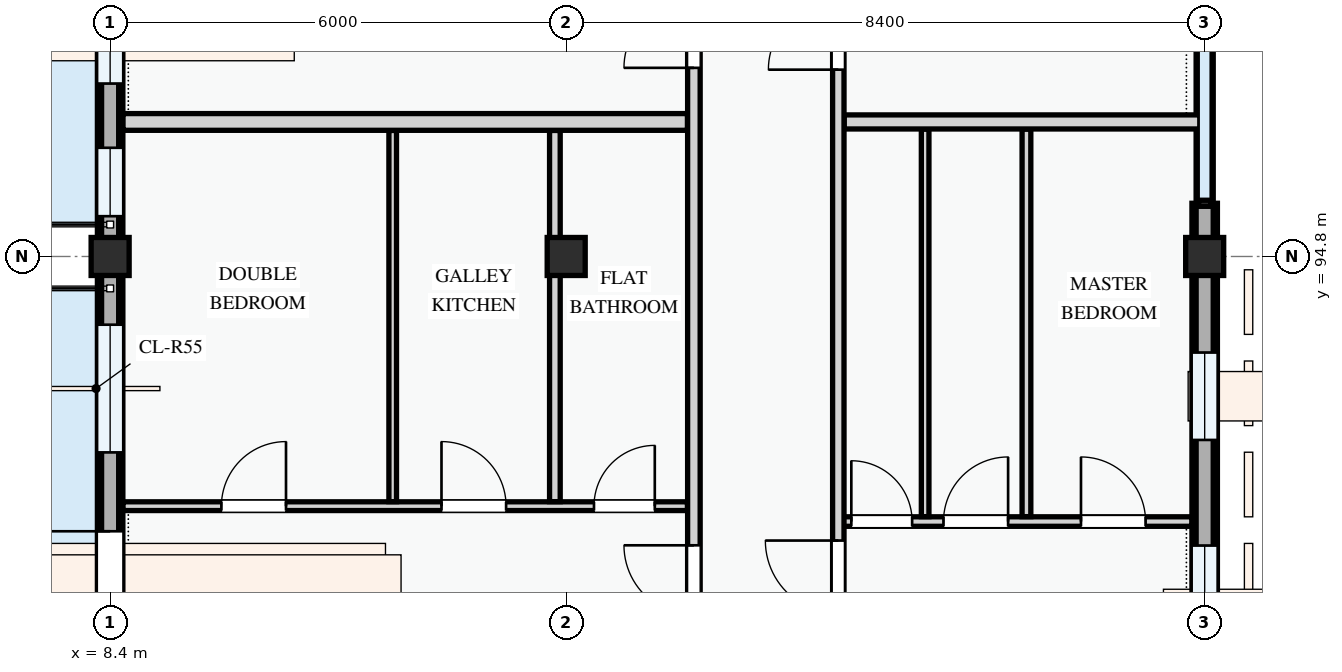
"""IFC4 building model, lengths in metres.
Left out: names, types, materials, properties, quantities, classifications, styles, units other than length and angle.
Written with IfcOpenShell. Run it as: python <this file> out.ifc"""

import sys

from ifc_helpers import new_model, si_unit, direction, frame, frame_2d, origin, origin_2d, place, context, subcontext, project, spatial, polyline, rectangle, outline, extrude, element, fill, save


model = new_model("IFC4")
c1 = context("Model", 3, precision=1e-05, world=origin(), true_north=direction((0.0, 1.0)))
c2 = subcontext(c1, "Body", "Model", "MODEL_VIEW")
j1 = project(units=[si_unit("LENGTHUNIT", "METRE"), si_unit("PLANEANGLEUNIT", "RADIAN")], contexts=[c1])
p1 = place(None, origin())
s1 = spatial("IfcSite", under=j1, at=p1, CompositionType="ELEMENT")
p2 = place(p1, origin())
s2 = spatial("IfcBuilding", under=s1, at=p2, CompositionType="ELEMENT")
p3 = place(p2, frame((0.0, 0.0, 51.0)))
s3 = spatial("IfcBuildingStorey", under=s2, at=p3, CompositionType="ELEMENT", Elevation=51.0)
for number, where, z_axis, x_axis in (
    (1, (8.4, 94.8, 0.0), (0.0, 0.0, 1.0), (1.0, 0.0, 0.0)),
    (2, (14.4, 94.8, 0.0), (0.0, 0.0, 1.0), (1.0, 0.0, 0.0)),
    (3, (22.8, 94.8, 0.0), (0.0, 0.0, 1.0), (1.0, 0.0, 0.0)),
):
    element("IfcColumn", number, at=place(p3, frame(where, z_axis=z_axis, x_axis=x_axis)), inside=s3, PredefinedType="COLUMN", context=c2, shape_type="SweptSolid", body=[
        extrude(rectangle(XDim=0.5, YDim=0.5, at=origin_2d()), origin(), (0.0, 0.0, 1.0), 3.3),
    ])
p4 = place(p3, frame((8.4, 100.8, 0.0), z_axis=(0.0, 0.0, 1.0), x_axis=(0.0, -1.0, 0.0)))
e4 = element("IfcWall", 4, at=p4, inside=s3, PredefinedType="STANDARD", context=c2, shape_type="SweptSolid", body=[
    extrude(rectangle(XDim=6.0, YDim=0.335, at=frame_2d((3.0, 0.0))), origin(), (0.0, 0.0, 1.0), 2.595),
])
p5 = place(p4, frame((0.62, 0.0, 0.0)))
e5 = element("IfcOpeningElement", 5, at=p5, cuts=e4, PredefinedType="OPENING", context=c2, shape_type="SweptSolid", body=[
    extrude(rectangle(XDim=1.2, YDim=2.15, at=frame_2d((0.6, 1.075))), frame((0.0, 0.177, 0.0), z_axis=(0.0, -1.0, 0.0), x_axis=(1.0, 0.0, 0.0)), (0.0, 0.0, 1.0), 0.355),
])
p6 = place(p4, frame((2.375, 0.0, 0.78)))
e6 = element("IfcOpeningElement", 6, at=p6, cuts=e4, PredefinedType="OPENING", context=c2, shape_type="SweptSolid", body=[
    extrude(rectangle(XDim=1.35, YDim=1.55, at=frame_2d((0.675, 0.775))), frame((0.0, 0.177, 0.0), z_axis=(0.0, -1.0, 0.0), x_axis=(1.0, 0.0, 0.0)), (0.0, 0.0, 1.0), 0.355),
])
p7 = place(p4, frame((4.57, 0.0, 0.78)))
e7 = element("IfcOpeningElement", 7, at=p7, cuts=e4, PredefinedType="OPENING", context=c2, shape_type="SweptSolid", body=[
    extrude(rectangle(XDim=0.9, YDim=1.2, at=frame_2d((0.45, 0.6))), frame((0.0, 0.177, 0.0), z_axis=(0.0, -1.0, 0.0), x_axis=(1.0, 0.0, 0.0)), (0.0, 0.0, 1.0), 0.355),
])
p8 = place(p3, frame((8.4, 94.8, 0.0), z_axis=(0.0, 0.0, 1.0), x_axis=(0.0, -1.0, 0.0)))
e8 = element("IfcWall", 8, at=p8, inside=s3, PredefinedType="STANDARD", context=c2, shape_type="SweptSolid", body=[
    extrude(rectangle(XDim=8.4, YDim=0.335, at=frame_2d((4.2, 0.0))), origin(), (0.0, 0.0, 1.0), 2.445),
])
p9 = place(p8, frame((3.615, 0.0, 0.0)))
e9 = element("IfcOpeningElement", 9, at=p9, cuts=e8, PredefinedType="OPENING", context=c2, shape_type="SweptSolid", body=[
    extrude(rectangle(XDim=1.25, YDim=2.2, at=frame_2d((0.625, 1.1))), frame((0.0, 0.177, 0.0), z_axis=(0.0, -1.0, 0.0), x_axis=(1.0, 0.0, 0.0)), (0.0, 0.0, 1.0), 0.355),
])
p10 = place(p8, frame((0.897, 0.0, 0.78)))
e10 = element("IfcOpeningElement", 10, at=p10, cuts=e8, PredefinedType="OPENING", context=c2, shape_type="SweptSolid", body=[
    extrude(rectangle(XDim=1.68, YDim=1.46, at=frame_2d((0.84, 0.73))), frame((0.0, 0.177, 0.0), z_axis=(0.0, -1.0, 0.0), x_axis=(1.0, 0.0, 0.0)), (0.0, 0.0, 1.0), 0.355),
])
p11 = place(p8, frame((6.038, 0.0, 0.78)))
e11 = element("IfcOpeningElement", 11, at=p11, cuts=e8, PredefinedType="OPENING", context=c2, shape_type="SweptSolid", body=[
    extrude(rectangle(XDim=1.05, YDim=1.2, at=frame_2d((0.525, 0.6))), frame((0.0, 0.177, 0.0), z_axis=(0.0, -1.0, 0.0), x_axis=(1.0, 0.0, 0.0)), (0.0, 0.0, 1.0), 0.355),
])
p12 = place(p3, frame((22.8, 86.4, 0.0), z_axis=(0.0, 0.0, 1.0), x_axis=(0.0, 1.0, 0.0)))
e12 = element("IfcWall", 12, at=p12, inside=s3, PredefinedType="STANDARD", context=c2, shape_type="SweptSolid", body=[
    extrude(rectangle(XDim=8.4, YDim=0.335, at=frame_2d((4.2, 0.0))), origin(), (0.0, 0.0, 1.0), 2.445),
])
p13 = place(p12, frame((0.731, 0.0, 0.78)))
e13 = element("IfcOpeningElement", 13, at=p13, cuts=e12, PredefinedType="OPENING", context=c2, shape_type="SweptSolid", body=[
    extrude(rectangle(XDim=1.35, YDim=1.55, at=frame_2d((0.675, 0.775))), frame((0.0, 0.177, 0.0), z_axis=(0.0, -1.0, 0.0), x_axis=(1.0, 0.0, 0.0)), (0.0, 0.0, 1.0), 0.355),
])
p14 = place(p12, frame((2.797, 0.0, 0.78)))
e14 = element("IfcOpeningElement", 14, at=p14, cuts=e12, PredefinedType="OPENING", context=c2, shape_type="SweptSolid", body=[
    extrude(rectangle(XDim=1.8, YDim=1.5, at=frame_2d((0.9, 0.75))), frame((0.0, 0.177, 0.0), z_axis=(0.0, -1.0, 0.0), x_axis=(1.0, 0.0, 0.0)), (0.0, 0.0, 1.0), 0.355),
])
p15 = place(p12, frame((5.986, 0.0, 0.78)))
e15 = element("IfcOpeningElement", 15, at=p15, cuts=e12, PredefinedType="OPENING", context=c2, shape_type="SweptSolid", body=[
    extrude(rectangle(XDim=1.15, YDim=1.25, at=frame_2d((0.575, 0.625))), frame((0.0, 0.177, 0.0), z_axis=(0.0, -1.0, 0.0), x_axis=(1.0, 0.0, 0.0)), (0.0, 0.0, 1.0), 0.355),
])
p16 = place(p3, frame((22.8, 94.8, 0.0), z_axis=(0.0, 0.0, 1.0), x_axis=(0.0, 1.0, 0.0)))
e16 = element("IfcWall", 16, at=p16, inside=s3, PredefinedType="STANDARD", context=c2, shape_type="SweptSolid", body=[
    extrude(rectangle(XDim=0.7, YDim=0.335, at=frame_2d((0.35, 0.0))), origin(), (0.0, 0.0, 1.0), 2.595),
])
p17 = place(p3, frame((8.4, 100.8, 3.3), z_axis=(0.0, 0.0, 1.0), x_axis=(0.0, -1.0, 0.0)))
e17 = element("IfcWall", 17, at=p17, inside=s3, PredefinedType="PARAPET", context=c2, shape_type="SweptSolid", body=[
    extrude(outline(polyline([(0.0, 0.0), (6.0, 0.0), (6.0, 1.12), (5.5, 1.322), (5.0, 1.484), (4.5, 1.618), (4.0, 1.717), (3.5, 1.779), (3.0, 1.8), (2.5, 1.779), (2.0, 1.717), (1.5, 1.618), (1.0, 1.484), (0.5, 1.322), (0.0, 1.12), (0.0, 0.0)])), frame((0.0, 0.113, 0.0), z_axis=(0.0, -1.0, 0.0), x_axis=(1.0, 0.0, 0.0)), (0.0, 0.0, 1.0), 0.225),
])
p18 = place(p3, frame((8.4, 94.8, 3.3), z_axis=(0.0, 0.0, 1.0), x_axis=(0.0, -1.0, 0.0)))
e18 = element("IfcWall", 18, at=p18, inside=s3, PredefinedType="PARAPET", context=c2, shape_type="SweptSolid", body=[
    extrude(outline(polyline([(0.0, 0.0), (8.4, 0.0), (8.4, 1.12), (7.7, 1.322), (7.0, 1.484), (6.3, 1.618), (5.6, 1.717), (4.9, 1.779), (4.2, 1.8), (3.5, 1.779), (2.8, 1.717), (2.1, 1.618), (1.4, 1.484), (0.7, 1.322), (0.0, 1.12), (0.0, 0.0)])), frame((0.0, 0.113, 0.0), z_axis=(0.0, -1.0, 0.0), x_axis=(1.0, 0.0, 0.0)), (0.0, 0.0, 1.0), 0.225),
])
p19 = place(p3, frame((22.8, 86.4, 3.3), z_axis=(0.0, 0.0, 1.0), x_axis=(0.0, 1.0, 0.0)))
e19 = element("IfcWall", 19, at=p19, inside=s3, PredefinedType="PARAPET", context=c2, shape_type="SweptSolid", body=[
    extrude(rectangle(XDim=22.8, YDim=0.225, at=frame_2d((11.4, 0.0))), origin(), (0.0, 0.0, 1.0), 1.15),
])
p20 = place(p3, frame((8.57, 91.515, 0.0), z_axis=(0.0, 0.0, 1.0), x_axis=(1.0, 0.0, 0.0)))
e20 = element("IfcWall", 20, at=p20, inside=s3, PredefinedType="PARTITIONING", context=c2, shape_type="SweptSolid", body=[
    extrude(rectangle(XDim=7.426, YDim=0.115, at=frame_2d((3.713, 0.0))), origin(), (0.0, 0.0, 1.0), 3.0),
])
p21 = place(p20, frame((1.294, 0.0, 0.0)))
e21 = element("IfcOpeningElement", 21, at=p21, cuts=e20, PredefinedType="OPENING", context=c2, shape_type="SweptSolid", body=[
    extrude(rectangle(XDim=0.85, YDim=2.1, at=frame_2d((0.425, 1.05))), frame((0.0, 0.067, 0.0), z_axis=(0.0, -1.0, 0.0), x_axis=(1.0, 0.0, 0.0)), (0.0, 0.0, 1.0), 0.135),
])
p22 = place(p20, frame((4.19, 0.0, 0.0)))
e22 = element("IfcOpeningElement", 22, at=p22, cuts=e20, PredefinedType="OPENING", context=c2, shape_type="SweptSolid", body=[
    extrude(rectangle(XDim=0.85, YDim=2.1, at=frame_2d((0.425, 1.05))), frame((0.0, 0.067, 0.0), z_axis=(0.0, -1.0, 0.0), x_axis=(1.0, 0.0, 0.0)), (0.0, 0.0, 1.0), 0.135),
])
p23 = place(p20, frame((6.196, 0.0, 0.0)))
e23 = element("IfcOpeningElement", 23, at=p23, cuts=e20, PredefinedType="OPENING", context=c2, shape_type="SweptSolid", body=[
    extrude(rectangle(XDim=0.8, YDim=2.1, at=frame_2d((0.4, 1.05))), frame((0.0, 0.067, 0.0), z_axis=(0.0, -1.0, 0.0), x_axis=(1.0, 0.0, 0.0)), (0.0, 0.0, 1.0), 0.135),
])
p24 = place(p3, frame((12.118, 91.574, 0.0), z_axis=(0.0, 0.0, 1.0), x_axis=(0.0, 1.0, 0.0)))
e24 = element("IfcWall", 24, at=p24, inside=s3, PredefinedType="PARTITIONING", context=c2, shape_type="SweptSolid", body=[
    extrude(rectangle(XDim=4.884, YDim=0.1, at=frame_2d((2.442, 0.0))), origin(), (0.0, 0.0, 1.0), 3.0),
])
p25 = place(p3, frame((14.251, 91.574, 0.0), z_axis=(0.0, 0.0, 1.0), x_axis=(0.0, 1.0, 0.0)))
e25 = element("IfcWall", 25, at=p25, inside=s3, PredefinedType="PARTITIONING", context=c2, shape_type="SweptSolid", body=[
    extrude(rectangle(XDim=4.884, YDim=0.14, at=frame_2d((2.442, 0.0))), origin(), (0.0, 0.0, 1.0), 2.445),
])
p26 = place(p3, frame((17.98, 91.313, 0.0), z_axis=(0.0, 0.0, 1.0), x_axis=(1.0, 0.0, 0.0)))
e26 = element("IfcWall", 26, at=p26, inside=s3, PredefinedType="PARTITIONING", context=c2, shape_type="SweptSolid", body=[
    extrude(rectangle(XDim=4.651, YDim=0.125, at=frame_2d((2.325, 0.0))), origin(), (0.0, 0.0, 1.0), 3.0),
])
p27 = place(p26, frame((0.171, 0.0, 0.0)))
e27 = element("IfcOpeningElement", 27, at=p27, cuts=e26, PredefinedType="OPENING", context=c2, shape_type="SweptSolid", body=[
    extrude(rectangle(XDim=0.8, YDim=2.1, at=frame_2d((0.4, 1.05))), frame((0.0, 0.073, 0.0), z_axis=(0.0, -1.0, 0.0), x_axis=(1.0, 0.0, 0.0)), (0.0, 0.0, 1.0), 0.145),
])
p28 = place(p26, frame((1.384, 0.0, 0.0)))
e28 = element("IfcOpeningElement", 28, at=p28, cuts=e26, PredefinedType="OPENING", context=c2, shape_type="SweptSolid", body=[
    extrude(rectangle(XDim=0.85, YDim=2.1, at=frame_2d((0.425, 1.05))), frame((0.0, 0.073, 0.0), z_axis=(0.0, -1.0, 0.0), x_axis=(1.0, 0.0, 0.0)), (0.0, 0.0, 1.0), 0.145),
])
p29 = place(p26, frame((3.193, 0.0, 0.0)))
e29 = element("IfcOpeningElement", 29, at=p29, cuts=e26, PredefinedType="OPENING", context=c2, shape_type="SweptSolid", body=[
    extrude(rectangle(XDim=0.85, YDim=2.1, at=frame_2d((0.425, 1.05))), frame((0.0, 0.073, 0.0), z_axis=(0.0, -1.0, 0.0), x_axis=(1.0, 0.0, 0.0)), (0.0, 0.0, 1.0), 0.145),
])
p30 = place(p3, frame((20.455, 91.377, 0.0), z_axis=(0.0, 0.0, 1.0), x_axis=(0.0, 1.0, 0.0)))
e30 = element("IfcWall", 30, at=p30, inside=s3, PredefinedType="PARTITIONING", context=c2, shape_type="SweptSolid", body=[
    extrude(rectangle(XDim=5.098, YDim=0.115, at=frame_2d((2.549, 0.0))), origin(), (0.0, 0.0, 1.0), 3.0),
])
p31 = place(p3, frame((19.122, 91.377, 0.0), z_axis=(0.0, 0.0, 1.0), x_axis=(0.0, 1.0, 0.0)))
e31 = element("IfcWall", 31, at=p31, inside=s3, PredefinedType="PARTITIONING", context=c2, shape_type="SweptSolid", body=[
    extrude(rectangle(XDim=5.098, YDim=0.1, at=frame_2d((2.549, 0.0))), origin(), (0.0, 0.0, 1.0), 3.0),
])
p32 = place(p3, frame((8.57, 96.57, 0.0), z_axis=(0.0, 0.0, 1.0), x_axis=(1.0, 0.0, 0.0)))
e32 = element("IfcWall", 32, at=p32, inside=s3, PredefinedType="PARTITIONING", context=c2, shape_type="SweptSolid", body=[
    extrude(rectangle(XDim=7.426, YDim=0.22, at=frame_2d((3.713, 0.0))), origin(), (0.0, 0.0, 1.0), 3.0),
])
p33 = place(p3, frame((18.057, 96.57, 0.0), z_axis=(0.0, 0.0, 1.0), x_axis=(1.0, 0.0, 0.0)))
e33 = element("IfcWall", 33, at=p33, inside=s3, PredefinedType="PARTITIONING", context=c2, shape_type="SweptSolid", body=[
    extrude(rectangle(XDim=4.683, YDim=0.185, at=frame_2d((2.342, 0.0))), origin(), (0.0, 0.0, 1.0), 3.0),
])
p34 = place(p3, frame((16.08, 86.46, 0.0), z_axis=(0.0, 0.0, 1.0), x_axis=(0.0, 1.0, 0.0)))
e34 = element("IfcWall", 34, at=p34, inside=s3, PredefinedType="PARTITIONING", context=c2, shape_type="SweptSolid", body=[
    extrude(rectangle(XDim=22.88, YDim=0.165, at=frame_2d((11.44, 0.0))), origin(), (0.0, 0.0, 1.0), 3.0),
])
p35 = place(p34, frame((3.62, 0.0, 0.0)))
e35 = element("IfcOpeningElement", 35, at=p35, cuts=e34, PredefinedType="OPENING", context=c2, shape_type="SweptSolid", body=[
    extrude(rectangle(XDim=0.92, YDim=2.1, at=frame_2d((0.46, 1.05))), frame((0.0, 0.093, 0.0), z_axis=(0.0, -1.0, 0.0), x_axis=(1.0, 0.0, 0.0)), (0.0, 0.0, 1.0), 0.185),
])
p36 = place(p34, frame((10.822, 0.0, 0.0)))
e36 = element("IfcOpeningElement", 36, at=p36, cuts=e34, PredefinedType="OPENING", context=c2, shape_type="SweptSolid", body=[
    extrude(rectangle(XDim=0.92, YDim=2.1, at=frame_2d((0.46, 1.05))), frame((0.0, 0.093, 0.0), z_axis=(0.0, -1.0, 0.0), x_axis=(1.0, 0.0, 0.0)), (0.0, 0.0, 1.0), 0.185),
])
p37 = place(p3, frame((17.98, 86.46, 0.0), z_axis=(0.0, 0.0, 1.0), x_axis=(0.0, 1.0, 0.0)))
e37 = element("IfcWall", 37, at=p37, inside=s3, PredefinedType="PARTITIONING", context=c2, shape_type="SweptSolid", body=[
    extrude(rectangle(XDim=22.88, YDim=0.15, at=frame_2d((11.44, 0.0))), origin(), (0.0, 0.0, 1.0), 3.0),
])
p38 = place(p37, frame((3.643, 0.0, 0.0)))
e38 = element("IfcOpeningElement", 38, at=p38, cuts=e37, PredefinedType="OPENING", context=c2, shape_type="SweptSolid", body=[
    extrude(rectangle(XDim=0.96, YDim=2.12, at=frame_2d((0.48, 1.06))), frame((0.0, 0.085, 0.0), z_axis=(0.0, -1.0, 0.0), x_axis=(1.0, 0.0, 0.0)), (0.0, 0.0, 1.0), 0.17),
])
p39 = place(p37, frame((10.798, 0.0, 0.0)))
e39 = element("IfcOpeningElement", 39, at=p39, cuts=e37, PredefinedType="OPENING", context=c2, shape_type="SweptSolid", body=[
    extrude(rectangle(XDim=0.92, YDim=2.1, at=frame_2d((0.46, 1.05))), frame((0.0, 0.085, 0.0), z_axis=(0.0, -1.0, 0.0), x_axis=(1.0, 0.0, 0.0)), (0.0, 0.0, 1.0), 0.17),
])
p40 = place(p6, origin())
e40 = element("IfcWindow", 40, at=p40, inside=s3, PartitioningType="SINGLE_PANEL", PredefinedType="WINDOW", context=c2, shape_type="SweptSolid", body=[
    extrude(rectangle(XDim=1.35, YDim=1.55, at=frame_2d((0.675, 0.775))), frame((0.0, 0.03, 0.0), z_axis=(0.0, -1.0, 0.0), x_axis=(1.0, 0.0, 0.0)), (0.0, 0.0, 1.0), 0.06),
])
fill(e6, e40)
p41 = place(p7, origin())
e41 = element("IfcWindow", 41, at=p41, inside=s3, PartitioningType="SINGLE_PANEL", PredefinedType="WINDOW", context=c2, shape_type="SweptSolid", body=[
    extrude(rectangle(XDim=0.9, YDim=1.2, at=frame_2d((0.45, 0.6))), frame((0.0, 0.03, 0.0), z_axis=(0.0, -1.0, 0.0), x_axis=(1.0, 0.0, 0.0)), (0.0, 0.0, 1.0), 0.06),
])
fill(e7, e41)
p42 = place(p9, frame((1.25, 0.0, 0.0), z_axis=(0.0, 0.0, 1.0), x_axis=(-1.0, 0.0, 0.0)))
e42 = element("IfcDoor", 42, at=p42, inside=s3, OperationType="SINGLE_SWING_RIGHT", PredefinedType="DOOR", context=c2, shape_type="SweptSolid", body=[
    extrude(rectangle(XDim=1.25, YDim=2.2, at=frame_2d((0.625, 1.1))), frame((0.0, 0.025, 0.0), z_axis=(0.0, -1.0, 0.0), x_axis=(1.0, 0.0, 0.0)), (0.0, 0.0, 1.0), 0.05),
])
fill(e9, e42)
p43 = place(p10, origin())
e43 = element("IfcWindow", 43, at=p43, inside=s3, PartitioningType="DOUBLE_PANEL_VERTICAL", PredefinedType="WINDOW", context=c2, shape_type="SweptSolid", body=[
    extrude(rectangle(XDim=1.68, YDim=1.46, at=frame_2d((0.84, 0.73))), frame((0.0, 0.03, 0.0), z_axis=(0.0, -1.0, 0.0), x_axis=(1.0, 0.0, 0.0)), (0.0, 0.0, 1.0), 0.06),
])
fill(e10, e43)
p44 = place(p14, origin())
e44 = element("IfcWindow", 44, at=p44, inside=s3, PartitioningType="DOUBLE_PANEL_VERTICAL", PredefinedType="WINDOW", context=c2, shape_type="SweptSolid", body=[
    extrude(rectangle(XDim=1.8, YDim=1.5, at=frame_2d((0.9, 0.75))), frame((0.0, 0.03, 0.0), z_axis=(0.0, -1.0, 0.0), x_axis=(1.0, 0.0, 0.0)), (0.0, 0.0, 1.0), 0.06),
])
fill(e14, e44)
p45 = place(p15, origin())
e45 = element("IfcWindow", 45, at=p45, inside=s3, PartitioningType="SINGLE_PANEL", PredefinedType="WINDOW", context=c2, shape_type="SweptSolid", body=[
    extrude(rectangle(XDim=1.15, YDim=1.25, at=frame_2d((0.575, 0.625))), frame((0.0, 0.03, 0.0), z_axis=(0.0, -1.0, 0.0), x_axis=(1.0, 0.0, 0.0)), (0.0, 0.0, 1.0), 0.06),
])
fill(e15, e45)
p46 = place(p21, origin())
e46 = element("IfcDoor", 46, at=p46, inside=s3, OperationType="SINGLE_SWING_RIGHT", PredefinedType="DOOR", context=c2, shape_type="SweptSolid", body=[
    extrude(rectangle(XDim=0.85, YDim=2.1, at=frame_2d((0.425, 1.05))), frame((0.0, 0.025, 0.0), z_axis=(0.0, -1.0, 0.0), x_axis=(1.0, 0.0, 0.0)), (0.0, 0.0, 1.0), 0.05),
])
fill(e21, e46)
p47 = place(p22, origin())
e47 = element("IfcDoor", 47, at=p47, inside=s3, OperationType="SINGLE_SWING_LEFT", PredefinedType="DOOR", context=c2, shape_type="SweptSolid", body=[
    extrude(rectangle(XDim=0.85, YDim=2.1, at=frame_2d((0.425, 1.05))), frame((0.0, 0.025, 0.0), z_axis=(0.0, -1.0, 0.0), x_axis=(1.0, 0.0, 0.0)), (0.0, 0.0, 1.0), 0.05),
])
fill(e22, e47)
p48 = place(p23, origin())
e48 = element("IfcDoor", 48, at=p48, inside=s3, OperationType="SINGLE_SWING_RIGHT", PredefinedType="DOOR", context=c2, shape_type="SweptSolid", body=[
    extrude(rectangle(XDim=0.8, YDim=2.1, at=frame_2d((0.4, 1.05))), frame((0.0, 0.025, 0.0), z_axis=(0.0, -1.0, 0.0), x_axis=(1.0, 0.0, 0.0)), (0.0, 0.0, 1.0), 0.05),
])
fill(e23, e48)
p49 = place(p27, origin())
e49 = element("IfcDoor", 49, at=p49, inside=s3, OperationType="SINGLE_SWING_LEFT", PredefinedType="DOOR", context=c2, shape_type="SweptSolid", body=[
    extrude(rectangle(XDim=0.8, YDim=2.1, at=frame_2d((0.4, 1.05))), frame((0.0, 0.025, 0.0), z_axis=(0.0, -1.0, 0.0), x_axis=(1.0, 0.0, 0.0)), (0.0, 0.0, 1.0), 0.05),
])
fill(e27, e49)
p50 = place(p28, origin())
e50 = element("IfcDoor", 50, at=p50, inside=s3, OperationType="SINGLE_SWING_RIGHT", PredefinedType="DOOR", context=c2, shape_type="SweptSolid", body=[
    extrude(rectangle(XDim=0.85, YDim=2.1, at=frame_2d((0.425, 1.05))), frame((0.0, 0.025, 0.0), z_axis=(0.0, -1.0, 0.0), x_axis=(1.0, 0.0, 0.0)), (0.0, 0.0, 1.0), 0.05),
])
fill(e28, e50)
p51 = place(p29, origin())
e51 = element("IfcDoor", 51, at=p51, inside=s3, OperationType="SINGLE_SWING_LEFT", PredefinedType="DOOR", context=c2, shape_type="SweptSolid", body=[
    extrude(rectangle(XDim=0.85, YDim=2.1, at=frame_2d((0.425, 1.05))), frame((0.0, 0.025, 0.0), z_axis=(0.0, -1.0, 0.0), x_axis=(1.0, 0.0, 0.0)), (0.0, 0.0, 1.0), 0.05),
])
fill(e29, e51)
p52 = place(p35, origin())
e52 = element("IfcDoor", 52, at=p52, inside=s3, OperationType="SINGLE_SWING_RIGHT", PredefinedType="DOOR", context=c2, shape_type="SweptSolid", body=[
    extrude(rectangle(XDim=0.92, YDim=2.1, at=frame_2d((0.46, 1.05))), frame((0.0, 0.025, 0.0), z_axis=(0.0, -1.0, 0.0), x_axis=(1.0, 0.0, 0.0)), (0.0, 0.0, 1.0), 0.05),
])
fill(e35, e52)
p53 = place(p36, origin())
e53 = element("IfcDoor", 53, at=p53, inside=s3, OperationType="SINGLE_SWING_LEFT", PredefinedType="DOOR", context=c2, shape_type="SweptSolid", body=[
    extrude(rectangle(XDim=0.92, YDim=2.1, at=frame_2d((0.46, 1.05))), frame((0.0, 0.025, 0.0), z_axis=(0.0, -1.0, 0.0), x_axis=(1.0, 0.0, 0.0)), (0.0, 0.0, 1.0), 0.05),
])
fill(e36, e53)
p54 = place(p38, origin())
e54 = element("IfcDoor", 54, at=p54, inside=s3, OperationType="SINGLE_SWING_RIGHT", PredefinedType="DOOR", context=c2, shape_type="SweptSolid", body=[
    extrude(rectangle(XDim=0.96, YDim=2.12, at=frame_2d((0.48, 1.06))), frame((0.0, 0.025, 0.0), z_axis=(0.0, -1.0, 0.0), x_axis=(1.0, 0.0, 0.0)), (0.0, 0.0, 1.0), 0.05),
])
fill(e38, e54)
p55 = place(p39, origin())
e55 = element("IfcDoor", 55, at=p55, inside=s3, OperationType="SINGLE_SWING_LEFT", PredefinedType="DOOR", context=c2, shape_type="SweptSolid", body=[
    extrude(rectangle(XDim=0.92, YDim=2.1, at=frame_2d((0.46, 1.05))), frame((0.0, 0.025, 0.0), z_axis=(0.0, -1.0, 0.0), x_axis=(1.0, 0.0, 0.0)), (0.0, 0.0, 1.0), 0.05),
])
fill(e39, e55)
save(model, sys.argv[1])
